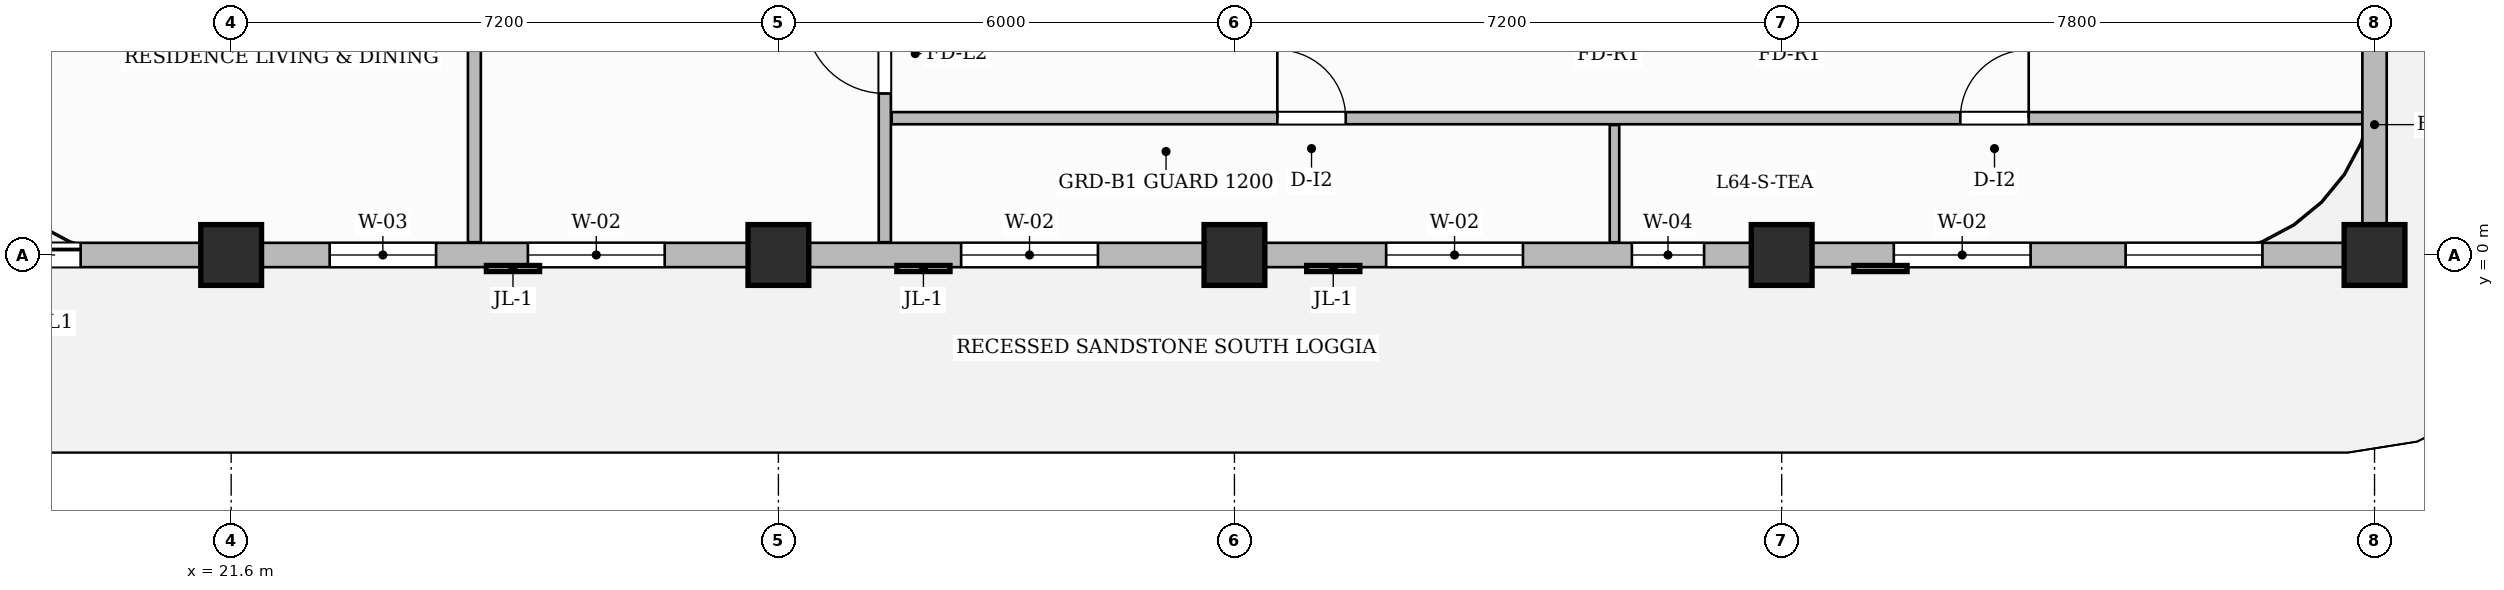
"""IFC4 building model, lengths in metres.
Left out: names, types, materials, properties, quantities, classifications, styles, units other than length and angle.
Written with IfcOpenShell. Run it as: python <this file> out.ifc"""

import sys

from ifc_helpers import new_model, si_unit, direction, frame, frame_2d, origin, origin_2d, place, context, subcontext, project, spatial, rectangle, extrude, source, transform, mapped, element, fill, save


model = new_model("IFC4")
c1 = context("Model", 3, precision=1e-05, world=origin(), true_north=direction((0.0, 1.0)))
c2 = subcontext(c1, "Body", "Model", "MODEL_VIEW")
j1 = project(units=[si_unit("LENGTHUNIT", "METRE"), si_unit("PLANEANGLEUNIT", "RADIAN")], contexts=[c1])
p1 = place(None, origin())
s1 = spatial("IfcSite", under=j1, at=p1, CompositionType="ELEMENT")
p2 = place(p1, origin())
s2 = spatial("IfcBuilding", under=s1, at=p2, CompositionType="ELEMENT")
p3 = place(p2, frame((0.0, 0.0, 255.8)))
s3 = spatial("IfcBuildingStorey", under=s2, at=p3, CompositionType="ELEMENT", Elevation=255.8)
m1 = source(origin(), c2, "Body", "SweptSolid", [
    extrude(rectangle(XDim=0.8, YDim=0.8, at=origin_2d()), origin(), (0.0, 0.0, 1.0), 3.85),
])
for number, where, z_axis, x_axis in (
    (1, (21.6, 0.0, 0.0), (0.0, 0.0, 1.0), (1.0, 0.0, 0.0)),
    (2, (28.8, 0.0, 0.0), (0.0, 0.0, 1.0), (1.0, 0.0, 0.0)),
    (3, (34.8, 0.0, 0.0), (0.0, 0.0, 1.0), (1.0, 0.0, 0.0)),
    (4, (42.0, 0.0, 0.0), (0.0, 0.0, 1.0), (1.0, 0.0, 0.0)),
    (5, (49.8, 0.0, 0.0), (0.0, 0.0, 1.0), (1.0, 0.0, 0.0)),
):
    element("IfcColumn", number, at=place(p3, frame(where, z_axis=z_axis, x_axis=x_axis)), inside=s3, PredefinedType="COLUMN", context=c2, shape_type="MappedRepresentation", body=[
        mapped(m1, transform((0.0, 0.0, 0.0), scale=1.0)),
    ])
p4 = place(p3, frame((30.2, 0.168, 0.0), z_axis=(0.0, 0.0, 1.0), x_axis=(0.0, 1.0, 0.0)))
e6 = element("IfcWall", 6, at=p4, inside=s3, PredefinedType="PARTITIONING", context=c2, shape_type="SweptSolid", body=[
    extrude(rectangle(XDim=9.892, YDim=0.16, at=frame_2d((4.946, 0.0))), origin(), (0.0, 0.0, 1.0), 3.6),
])
p5 = place(p4, frame((1.957, 0.0, 0.0)))
e7 = element("IfcOpeningElement", 7, at=p5, cuts=e6, PredefinedType="OPENING", context=c2, shape_type="SweptSolid", body=[
    extrude(rectangle(XDim=1.05, YDim=2.15, at=frame_2d((0.525, 1.075))), frame((0.0, 0.09, 0.0), z_axis=(0.0, -1.0, 0.0), x_axis=(1.0, 0.0, 0.0)), (0.0, 0.0, 1.0), 0.18),
])
p6 = place(p3, frame((30.29, 1.8, 0.0), z_axis=(0.0, 0.0, 1.0), x_axis=(1.0, 0.0, 0.0)))
e8 = element("IfcWall", 8, at=p6, inside=s3, PredefinedType="PARTITIONING", context=c2, shape_type="SweptSolid", body=[
    extrude(rectangle(XDim=19.37, YDim=0.16, at=frame_2d((9.685, 0.0))), origin(), (0.0, 0.0, 1.0), 3.6),
])
p7 = place(p6, frame((5.074, 0.0, 0.0)))
e9 = element("IfcOpeningElement", 9, at=p7, cuts=e8, PredefinedType="OPENING", context=c2, shape_type="SweptSolid", body=[
    extrude(rectangle(XDim=0.9, YDim=2.15, at=frame_2d((0.45, 1.075))), frame((0.0, 0.09, 0.0), z_axis=(0.0, -1.0, 0.0), x_axis=(1.0, 0.0, 0.0)), (0.0, 0.0, 1.0), 0.18),
])
p8 = place(p6, frame((14.06, 0.0, 0.0)))
e10 = element("IfcOpeningElement", 10, at=p8, cuts=e8, PredefinedType="OPENING", context=c2, shape_type="SweptSolid", body=[
    extrude(rectangle(XDim=0.9, YDim=2.15, at=frame_2d((0.45, 1.075))), frame((0.0, 0.09, 0.0), z_axis=(0.0, -1.0, 0.0), x_axis=(1.0, 0.0, 0.0)), (0.0, 0.0, 1.0), 0.18),
])
p9 = place(p3, frame((39.8, 0.168, 0.0), z_axis=(0.0, 0.0, 1.0), x_axis=(0.0, 1.0, 0.0)))
e11 = element("IfcWall", 11, at=p9, inside=s3, PredefinedType="PARTITIONING", context=c2, shape_type="SweptSolid", body=[
    extrude(rectangle(XDim=1.542, YDim=0.125, at=frame_2d((0.771, 0.0))), origin(), (0.0, 0.0, 1.0), 3.6),
])
p10 = place(p3, frame((24.8, 0.168, 0.0), z_axis=(0.0, 0.0, 1.0), x_axis=(0.0, 1.0, 0.0)))
e12 = element("IfcWall", 12, at=p10, inside=s3, PredefinedType="PARTITIONING", context=c2, shape_type="SweptSolid", body=[
    extrude(rectangle(XDim=9.892, YDim=0.17, at=frame_2d((4.946, 0.0))), origin(), (0.0, 0.0, 1.0), 3.6),
])
p11 = place(p10, frame((8.432, 0.0, 0.0)))
e13 = element("IfcOpeningElement", 13, at=p11, cuts=e12, PredefinedType="OPENING", context=c2, shape_type="SweptSolid", body=[
    extrude(rectangle(XDim=0.95, YDim=2.15, at=frame_2d((0.475, 1.075))), frame((0.0, 0.095, 0.0), z_axis=(0.0, -1.0, 0.0), x_axis=(1.0, 0.0, 0.0)), (0.0, 0.0, 1.0), 0.19),
])
p12 = place(p3, frame((18.0, 0.0, 0.0), z_axis=(0.0, 0.0, 1.0), x_axis=(1.0, 0.0, 0.0)))
e14 = element("IfcWall", 14, at=p12, inside=s3, PredefinedType="SOLIDWALL", context=c2, shape_type="SweptSolid", body=[
    extrude(rectangle(XDim=31.8, YDim=0.32, at=frame_2d((15.9, 0.0))), origin(), (0.0, 0.0, 1.0), 3.135),
])
p13 = place(p12, frame((0.42, 0.0, 0.0)))
e15 = element("IfcOpeningElement", 15, at=p13, cuts=e14, PredefinedType="OPENING", context=c2, shape_type="SweptSolid", body=[
    extrude(rectangle(XDim=1.2, YDim=2.2, at=frame_2d((0.6, 1.1))), frame((0.0, 0.17, 0.0), z_axis=(0.0, -1.0, 0.0), x_axis=(1.0, 0.0, 0.0)), (0.0, 0.0, 1.0), 0.34),
])
p14 = place(p12, frame((4.896, 0.0, 0.8)))
e16 = element("IfcOpeningElement", 16, at=p14, cuts=e14, PredefinedType="OPENING", context=c2, shape_type="SweptSolid", body=[
    extrude(rectangle(XDim=1.4, YDim=1.85, at=frame_2d((0.7, 0.925))), frame((0.0, 0.17, 0.0), z_axis=(0.0, -1.0, 0.0), x_axis=(1.0, 0.0, 0.0)), (0.0, 0.0, 1.0), 0.34),
])
p15 = place(p12, frame((7.504, 0.0, 0.8)))
e17 = element("IfcOpeningElement", 17, at=p15, cuts=e14, PredefinedType="OPENING", context=c2, shape_type="SweptSolid", body=[
    extrude(rectangle(XDim=1.8, YDim=1.85, at=frame_2d((0.9, 0.925))), frame((0.0, 0.17, 0.0), z_axis=(0.0, -1.0, 0.0), x_axis=(1.0, 0.0, 0.0)), (0.0, 0.0, 1.0), 0.34),
])
p16 = place(p12, frame((13.204, 0.0, 0.8)))
e18 = element("IfcOpeningElement", 18, at=p16, cuts=e14, PredefinedType="OPENING", context=c2, shape_type="SweptSolid", body=[
    extrude(rectangle(XDim=1.8, YDim=1.85, at=frame_2d((0.9, 0.925))), frame((0.0, 0.17, 0.0), z_axis=(0.0, -1.0, 0.0), x_axis=(1.0, 0.0, 0.0)), (0.0, 0.0, 1.0), 0.34),
])
p17 = place(p12, frame((18.796, 0.0, 0.8)))
e19 = element("IfcOpeningElement", 19, at=p17, cuts=e14, PredefinedType="OPENING", context=c2, shape_type="SweptSolid", body=[
    extrude(rectangle(XDim=1.8, YDim=1.85, at=frame_2d((0.9, 0.925))), frame((0.0, 0.17, 0.0), z_axis=(0.0, -1.0, 0.0), x_axis=(1.0, 0.0, 0.0)), (0.0, 0.0, 1.0), 0.34),
])
p18 = place(p12, frame((22.029, 0.0, 0.8)))
e20 = element("IfcOpeningElement", 20, at=p18, cuts=e14, PredefinedType="OPENING", context=c2, shape_type="SweptSolid", body=[
    extrude(rectangle(XDim=0.95, YDim=1.75, at=frame_2d((0.475, 0.875))), frame((0.0, 0.17, 0.0), z_axis=(0.0, -1.0, 0.0), x_axis=(1.0, 0.0, 0.0)), (0.0, 0.0, 1.0), 0.34),
])
p19 = place(p12, frame((25.475, 0.0, 0.8)))
e21 = element("IfcOpeningElement", 21, at=p19, cuts=e14, PredefinedType="OPENING", context=c2, shape_type="SweptSolid", body=[
    extrude(rectangle(XDim=1.8, YDim=1.85, at=frame_2d((0.9, 0.925))), frame((0.0, 0.17, 0.0), z_axis=(0.0, -1.0, 0.0), x_axis=(1.0, 0.0, 0.0)), (0.0, 0.0, 1.0), 0.34),
])
p20 = place(p12, frame((28.525, 0.0, 0.8)))
e22 = element("IfcOpeningElement", 22, at=p20, cuts=e14, PredefinedType="OPENING", context=c2, shape_type="SweptSolid", body=[
    extrude(rectangle(XDim=1.8, YDim=1.85, at=frame_2d((0.9, 0.925))), frame((0.0, 0.17, 0.0), z_axis=(0.0, -1.0, 0.0), x_axis=(1.0, 0.0, 0.0)), (0.0, 0.0, 1.0), 0.34),
])
p21 = place(p3, frame((49.8, 0.05, 0.0), z_axis=(0.0, 0.0, 1.0), x_axis=(0.0, 1.0, 0.0)))
e23 = element("IfcWall", 23, at=p21, inside=s3, PredefinedType="SOLIDWALL", context=c2, shape_type="SweptSolid", body=[
    extrude(rectangle(XDim=3.33, YDim=0.32, at=frame_2d((1.665, 0.0))), origin(), (0.0, 0.0, 1.0), 3.6),
])
m2 = source(origin(), c2, "Body", "SweptSolid", [
    extrude(rectangle(XDim=1.05, YDim=2.15, at=frame_2d((0.525, 1.075))), frame((0.0, 0.025, 0.0), z_axis=(0.0, -1.0, 0.0), x_axis=(1.0, 0.0, 0.0)), (0.0, 0.0, 1.0), 0.05),
])
p22 = place(p5, origin())
e24 = element("IfcDoor", 24, at=p22, inside=s3, OperationType="SINGLE_SWING_RIGHT", PredefinedType="DOOR", context=c2, shape_type="MappedRepresentation", body=[
    mapped(m2, transform((0.0, 0.0, 0.0), scale=1.0)),
])
fill(e7, e24)
m3 = source(origin(), c2, "Body", "SweptSolid", [
    extrude(rectangle(XDim=0.9, YDim=2.15, at=frame_2d((0.45, 1.075))), frame((0.0, 0.025, 0.0), z_axis=(0.0, -1.0, 0.0), x_axis=(1.0, 0.0, 0.0)), (0.0, 0.0, 1.0), 0.05),
])
p23 = place(p7, origin())
e25 = element("IfcDoor", 25, at=p23, inside=s3, OperationType="SINGLE_SWING_LEFT", PredefinedType="DOOR", context=c2, shape_type="MappedRepresentation", body=[
    mapped(m3, transform((0.0, 0.0, 0.0), scale=1.0)),
])
fill(e9, e25)
p24 = place(p8, origin())
e26 = element("IfcDoor", 26, at=p24, inside=s3, OperationType="SINGLE_SWING_RIGHT", PredefinedType="DOOR", context=c2, shape_type="MappedRepresentation", body=[
    mapped(m3, transform((0.0, 0.0, 0.0), scale=1.0)),
])
fill(e10, e26)
m4 = source(origin(), c2, "Body", "SweptSolid", [
    extrude(rectangle(XDim=1.2, YDim=2.2, at=frame_2d((0.6, 1.1))), frame((0.0, 0.025, 0.0), z_axis=(0.0, -1.0, 0.0), x_axis=(1.0, 0.0, 0.0)), (0.0, 0.0, 1.0), 0.05),
])
p25 = place(p13, origin())
e27 = element("IfcDoor", 27, at=p25, inside=s3, OperationType="SLIDING_TO_LEFT", PredefinedType="DOOR", context=c2, shape_type="MappedRepresentation", body=[
    mapped(m4, transform((0.0, 0.0, 0.0), scale=1.0)),
])
fill(e15, e27)
m5 = source(origin(), c2, "Body", "SweptSolid", [
    extrude(rectangle(XDim=1.4, YDim=1.85, at=frame_2d((0.7, 0.925))), frame((0.0, 0.03, 0.0), z_axis=(0.0, -1.0, 0.0), x_axis=(1.0, 0.0, 0.0)), (0.0, 0.0, 1.0), 0.06),
])
p26 = place(p14, origin())
e28 = element("IfcWindow", 28, at=p26, inside=s3, PartitioningType="SINGLE_PANEL", PredefinedType="WINDOW", context=c2, shape_type="MappedRepresentation", body=[
    mapped(m5, transform((0.0, 0.0, 0.0), scale=1.0)),
])
fill(e16, e28)
m6 = source(origin(), c2, "Body", "SweptSolid", [
    extrude(rectangle(XDim=1.8, YDim=1.85, at=frame_2d((0.9, 0.925))), frame((0.0, 0.03, 0.0), z_axis=(0.0, -1.0, 0.0), x_axis=(1.0, 0.0, 0.0)), (0.0, 0.0, 1.0), 0.06),
])
p27 = place(p15, origin())
e29 = element("IfcWindow", 29, at=p27, inside=s3, PartitioningType="DOUBLE_PANEL_VERTICAL", PredefinedType="WINDOW", context=c2, shape_type="MappedRepresentation", body=[
    mapped(m6, transform((0.0, 0.0, 0.0), scale=1.0)),
])
fill(e17, e29)
p28 = place(p16, origin())
e30 = element("IfcWindow", 30, at=p28, inside=s3, PartitioningType="DOUBLE_PANEL_VERTICAL", PredefinedType="WINDOW", context=c2, shape_type="MappedRepresentation", body=[
    mapped(m6, transform((0.0, 0.0, 0.0), scale=1.0)),
])
fill(e18, e30)
p29 = place(p17, origin())
e31 = element("IfcWindow", 31, at=p29, inside=s3, PartitioningType="DOUBLE_PANEL_VERTICAL", PredefinedType="WINDOW", context=c2, shape_type="MappedRepresentation", body=[
    mapped(m6, transform((0.0, 0.0, 0.0), scale=1.0)),
])
fill(e19, e31)
m7 = source(origin(), c2, "Body", "SweptSolid", [
    extrude(rectangle(XDim=0.95, YDim=1.75, at=frame_2d((0.475, 0.875))), frame((0.0, 0.03, 0.0), z_axis=(0.0, -1.0, 0.0), x_axis=(1.0, 0.0, 0.0)), (0.0, 0.0, 1.0), 0.06),
])
p30 = place(p18, origin())
e32 = element("IfcWindow", 32, at=p30, inside=s3, PartitioningType="SINGLE_PANEL", PredefinedType="WINDOW", context=c2, shape_type="MappedRepresentation", body=[
    mapped(m7, transform((0.0, 0.0, 0.0), scale=1.0)),
])
fill(e20, e32)
p31 = place(p19, origin())
e33 = element("IfcWindow", 33, at=p31, inside=s3, PartitioningType="DOUBLE_PANEL_VERTICAL", PredefinedType="WINDOW", context=c2, shape_type="MappedRepresentation", body=[
    mapped(m6, transform((0.0, 0.0, 0.0), scale=1.0)),
])
fill(e21, e33)
p32 = place(p20, origin())
e34 = element("IfcWindow", 34, at=p32, inside=s3, PartitioningType="DOUBLE_PANEL_VERTICAL", PredefinedType="WINDOW", context=c2, shape_type="MappedRepresentation", body=[
    mapped(m6, transform((0.0, 0.0, 0.0), scale=1.0)),
])
fill(e22, e34)
save(model, sys.argv[1])
